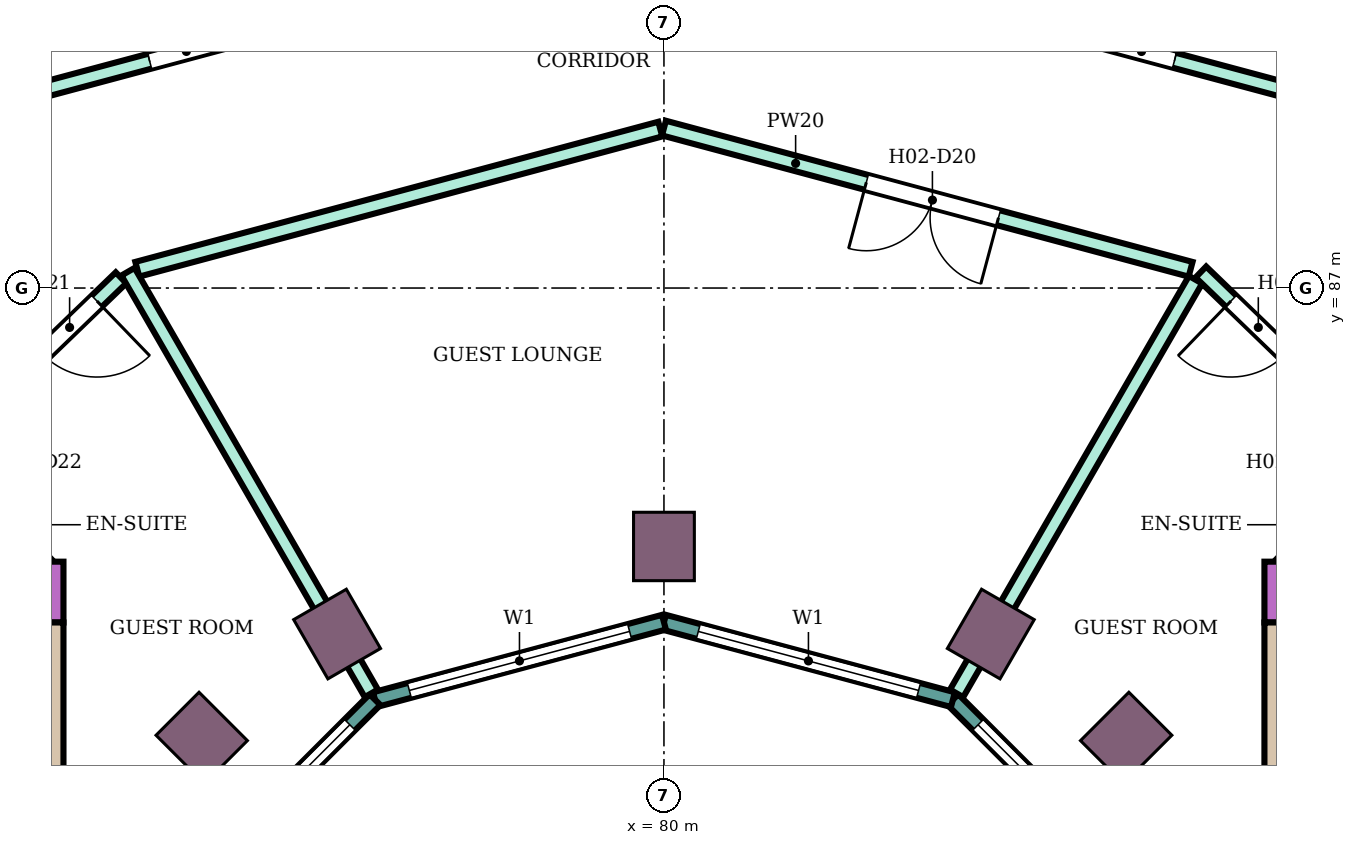
"""IFC4 building model, lengths in metres.
Left out: names, types, materials, properties, quantities, classifications, styles, units other than length and angle.
Written with IfcOpenShell. Run it as: python <this file> out.ifc"""

import sys

from ifc_helpers import new_model, si_unit, direction, frame, frame_2d, origin, origin_2d, place, context, subcontext, project, spatial, rectangle, extrude, element, fill, save


model = new_model("IFC4")
c1 = context("Model", 3, precision=1e-05, world=origin(), true_north=direction((0.0, 1.0)))
c2 = subcontext(c1, "Body", "Model", "MODEL_VIEW")
j1 = project(units=[si_unit("LENGTHUNIT", "METRE"), si_unit("PLANEANGLEUNIT", "RADIAN")], contexts=[c1])
p1 = place(None, origin())
s1 = spatial("IfcSite", under=j1, at=p1, CompositionType="ELEMENT")
p2 = place(p1, origin())
s2 = spatial("IfcBuilding", under=s1, at=p2, CompositionType="ELEMENT")
p3 = place(p2, frame((0.0, 0.0, 40.2)))
s3 = spatial("IfcBuildingStorey", under=s2, at=p3, CompositionType="ELEMENT", Elevation=40.2)
for number, where, z_axis, x_axis in (
    (1, (86.081, 81.081, 0.0), (0.0, 0.0, 1.0), (0.707, 0.707, 0.0)),
    (2, (84.3, 82.448, 0.0), (0.0, 0.0, 1.0), (0.5, 0.866, 0.0)),
    (3, (80.0, 83.6, 0.0), (0.0, 0.0, 1.0), (0.0, 1.0, 0.0)),
    (4, (75.7, 82.448, 0.0), (0.0, 0.0, 1.0), (-0.5, 0.866, 0.0)),
    (5, (73.919, 81.081, 0.0), (0.0, 0.0, 1.0), (-0.707, 0.707, 0.0)),
):
    element("IfcColumn", number, at=place(p3, frame(where, z_axis=z_axis, x_axis=x_axis)), inside=s3, PredefinedType="COLUMN", context=c2, shape_type="SweptSolid", body=[
        extrude(rectangle(XDim=0.9, YDim=0.8, at=origin_2d()), origin(), (0.0, 0.0, 1.0), 3.8),
    ])
p4 = place(p3, frame((87.9, 83.0, 0.0), z_axis=(0.0, 0.0, 1.0), x_axis=(1.0, 0.0, 0.0)))
e6 = element("IfcWall", 6, at=p4, inside=s3, PredefinedType="SHEAR", context=c2, shape_type="SweptSolid", body=[
    extrude(rectangle(XDim=14.7, YDim=0.8, at=frame_2d((7.35, 0.0))), origin(), (0.0, 0.0, 1.0), 3.48),
])
p5 = place(p4, frame((4.2, 0.0, 0.0)))
e7 = element("IfcOpeningElement", 7, at=p5, cuts=e6, PredefinedType="OPENING", context=c2, shape_type="SweptSolid", body=[
    extrude(rectangle(XDim=2.4, YDim=2.4, at=frame_2d((1.2, 1.2))), frame((0.0, 0.41, 0.0), z_axis=(0.0, -1.0, 0.0), x_axis=(1.0, 0.0, 0.0)), (0.0, 0.0, 1.0), 0.82),
])
p6 = place(p3, frame((88.125, 75.0, 0.0), z_axis=(0.0, 0.0, 1.0), x_axis=(0.0, 1.0, 0.0)))
e8 = element("IfcWall", 8, at=p6, inside=s3, PredefinedType="SHEAR", context=c2, shape_type="SweptSolid", body=[
    extrude(rectangle(XDim=7.6, YDim=0.45, at=frame_2d((3.8, 0.0))), origin(), (0.0, 0.0, 1.0), 3.48),
])
p7 = place(p3, frame((72.1, 83.0, 0.0), z_axis=(0.0, 0.0, 1.0), x_axis=(-1.0, 0.0, 0.0)))
e9 = element("IfcWall", 9, at=p7, inside=s3, PredefinedType="SHEAR", context=c2, shape_type="SweptSolid", body=[
    extrude(rectangle(XDim=14.7, YDim=0.8, at=frame_2d((7.35, 0.0))), origin(), (0.0, 0.0, 1.0), 3.48),
])
p8 = place(p7, frame((4.2, 0.0, 0.0)))
e10 = element("IfcOpeningElement", 10, at=p8, cuts=e9, PredefinedType="OPENING", context=c2, shape_type="SweptSolid", body=[
    extrude(rectangle(XDim=2.4, YDim=2.4, at=frame_2d((1.2, 1.2))), frame((0.0, 0.41, 0.0), z_axis=(0.0, -1.0, 0.0), x_axis=(1.0, 0.0, 0.0)), (0.0, 0.0, 1.0), 0.82),
])
p9 = place(p3, frame((71.875, 82.6, 0.0), z_axis=(0.0, 0.0, 1.0), x_axis=(0.0, -1.0, 0.0)))
e11 = element("IfcWall", 11, at=p9, inside=s3, PredefinedType="SHEAR", context=c2, shape_type="SweptSolid", body=[
    extrude(rectangle(XDim=7.6, YDim=0.45, at=frame_2d((3.8, 0.0))), origin(), (0.0, 0.0, 1.0), 3.48),
])
p10 = place(p3, frame((86.585, 78.802, 0.0), z_axis=(0.0, 0.0, 1.0), x_axis=(-0.707106781187, 0.707106781187, 0.0)))
e12 = element("IfcWall", 12, at=p10, inside=s3, PredefinedType="NOTDEFINED", context=c2, shape_type="SweptSolid", body=[
    extrude(rectangle(XDim=3.936, YDim=0.2, at=frame_2d((1.968, 0.0))), origin(), (0.0, 0.0, 1.0), 3.8),
])
p11 = place(p10, frame((0.468, 0.0, 0.9)))
e13 = element("IfcOpeningElement", 13, at=p11, cuts=e12, PredefinedType="OPENING", context=c2, shape_type="SweptSolid", body=[
    extrude(rectangle(XDim=3.0, YDim=2.3, at=frame_2d((1.5, 1.15))), frame((0.0, 0.11, 0.0), z_axis=(0.0, -1.0, 0.0), x_axis=(1.0, 0.0, 0.0)), (0.0, 0.0, 1.0), 0.22),
])
p12 = place(p3, frame((83.802, 81.585, 0.0), z_axis=(0.0, 0.0, 1.0), x_axis=(-0.965933654434, 0.258789828301, 0.0)))
e14 = element("IfcWall", 14, at=p12, inside=s3, PredefinedType="NOTDEFINED", context=c2, shape_type="SweptSolid", body=[
    extrude(rectangle(XDim=3.936, YDim=0.2, at=frame_2d((1.968, 0.0))), origin(), (0.0, 0.0, 1.0), 3.8),
])
p13 = place(p12, frame((0.468, 0.0, 0.9)))
e15 = element("IfcOpeningElement", 15, at=p13, cuts=e14, PredefinedType="OPENING", context=c2, shape_type="SweptSolid", body=[
    extrude(rectangle(XDim=3.0, YDim=2.3, at=frame_2d((1.5, 1.15))), frame((0.0, 0.11, 0.0), z_axis=(0.0, -1.0, 0.0), x_axis=(1.0, 0.0, 0.0)), (0.0, 0.0, 1.0), 0.22),
])
p14 = place(p3, frame((80.0, 82.604, 0.0), z_axis=(0.0, 0.0, 1.0), x_axis=(-0.965933654434, -0.258789828301, 0.0)))
e16 = element("IfcWall", 16, at=p14, inside=s3, PredefinedType="NOTDEFINED", context=c2, shape_type="SweptSolid", body=[
    extrude(rectangle(XDim=3.936, YDim=0.2, at=frame_2d((1.968, 0.0))), origin(), (0.0, 0.0, 1.0), 3.8),
])
p15 = place(p14, frame((0.468, 0.0, 0.9)))
e17 = element("IfcOpeningElement", 17, at=p15, cuts=e16, PredefinedType="OPENING", context=c2, shape_type="SweptSolid", body=[
    extrude(rectangle(XDim=3.0, YDim=2.3, at=frame_2d((1.5, 1.15))), frame((0.0, 0.11, 0.0), z_axis=(0.0, -1.0, 0.0), x_axis=(1.0, 0.0, 0.0)), (0.0, 0.0, 1.0), 0.22),
])
p16 = place(p3, frame((76.198, 81.585, 0.0), z_axis=(0.0, 0.0, 1.0), x_axis=(-0.707106781187, -0.707106781187, 0.0)))
e18 = element("IfcWall", 18, at=p16, inside=s3, PredefinedType="NOTDEFINED", context=c2, shape_type="SweptSolid", body=[
    extrude(rectangle(XDim=3.936, YDim=0.2, at=frame_2d((1.968, 0.0))), origin(), (0.0, 0.0, 1.0), 3.8),
])
p17 = place(p16, frame((0.468, 0.0, 0.9)))
e19 = element("IfcOpeningElement", 19, at=p17, cuts=e18, PredefinedType="OPENING", context=c2, shape_type="SweptSolid", body=[
    extrude(rectangle(XDim=3.0, YDim=2.3, at=frame_2d((1.5, 1.15))), frame((0.0, 0.11, 0.0), z_axis=(0.0, -1.0, 0.0), x_axis=(1.0, 0.0, 0.0)), (0.0, 0.0, 1.0), 0.22),
])
p18 = place(p3, frame((68.987, 83.4, 0.0), z_axis=(0.0, 0.0, 1.0), x_axis=(0.719591503389, 0.694397629784, 0.0)))
e20 = element("IfcWall", 20, at=p18, inside=s3, PredefinedType="PARTITIONING", context=c2, shape_type="SweptSolid", body=[
    extrude(rectangle(XDim=5.378, YDim=0.2, at=frame_2d((2.689, 0.0))), origin(), (0.0, 0.0, 1.0), 3.35),
])
p19 = place(p18, frame((3.938, 0.0, 0.0)))
e21 = element("IfcOpeningElement", 21, at=p19, cuts=e20, PredefinedType="OPENING", context=c2, shape_type="SweptSolid", body=[
    extrude(rectangle(XDim=1.0, YDim=2.1, at=frame_2d((0.5, 1.05))), frame((0.0, 0.11, 0.0), z_axis=(0.0, -1.0, 0.0), x_axis=(1.0, 0.0, 0.0)), (0.0, 0.0, 1.0), 0.22),
])
p20 = place(p3, frame((71.614, 89.55, 0.0), z_axis=(0.0, 0.0, 1.0), x_axis=(0.96597505802, 0.258635239832, 0.0)))
e22 = element("IfcWall", 22, at=p20, inside=s3, PredefinedType="PARTITIONING", context=c2, shape_type="SweptSolid", body=[
    extrude(rectangle(XDim=8.592, YDim=0.2, at=frame_2d((4.296, 0.0))), origin(), (0.0, 0.0, 1.0), 3.35),
])
p21 = place(p20, frame((4.865, 0.0, 0.0)))
e23 = element("IfcOpeningElement", 23, at=p21, cuts=e22, PredefinedType="OPENING", context=c2, shape_type="SweptSolid", body=[
    extrude(rectangle(XDim=1.0, YDim=2.1, at=frame_2d((0.5, 1.05))), frame((0.0, 0.11, 0.0), z_axis=(0.0, -1.0, 0.0), x_axis=(1.0, 0.0, 0.0)), (0.0, 0.0, 1.0), 0.22),
])
p22 = place(p20, frame((1.677, 0.0, 0.0)))
e24 = element("IfcOpeningElement", 24, at=p22, cuts=e22, PredefinedType="OPENING", context=c2, shape_type="SweptSolid", body=[
    extrude(rectangle(XDim=1.0, YDim=2.1, at=frame_2d((0.5, 1.05))), frame((0.0, 0.11, 0.0), z_axis=(0.0, -1.0, 0.0), x_axis=(1.0, 0.0, 0.0)), (0.0, 0.0, 1.0), 0.22),
])
p23 = place(p3, frame((73.071, 87.247, 0.0), z_axis=(0.0, 0.0, 1.0), x_axis=(0.965920206274, 0.258840018373, 0.0)))
e25 = element("IfcWall", 25, at=p23, inside=s3, PredefinedType="PARTITIONING", context=c2, shape_type="SweptSolid", body=[
    extrude(rectangle(XDim=7.123, YDim=0.2, at=frame_2d((3.562, 0.0))), origin(), (0.0, 0.0, 1.0), 3.35),
])
p24 = place(p3, frame((72.949, 87.215, 0.0), z_axis=(0.0, 0.0, 1.0), x_axis=(0.499890755261, -0.866088467077, 0.0)))
e26 = element("IfcWall", 26, at=p24, inside=s3, PredefinedType="PARTITIONING", context=c2, shape_type="SweptSolid", body=[
    extrude(rectangle(XDim=6.404, YDim=0.2, at=frame_2d((3.202, 0.0))), origin(), (0.0, 0.0, 1.0), 3.35),
])
p25 = place(p3, frame((80.0, 89.104, 0.0), z_axis=(0.0, 0.0, 1.0), x_axis=(0.965886659739, -0.258965172444, 0.0)))
e27 = element("IfcWall", 27, at=p25, inside=s3, PredefinedType="PARTITIONING", context=c2, shape_type="SweptSolid", body=[
    extrude(rectangle(XDim=7.173, YDim=0.2, at=frame_2d((3.587, 0.0))), origin(), (0.0, 0.0, 1.0), 3.35),
])
p26 = place(p25, frame((2.757, 0.0, 0.0)))
e28 = element("IfcOpeningElement", 28, at=p26, cuts=e27, PredefinedType="OPENING", context=c2, shape_type="SweptSolid", body=[
    extrude(rectangle(XDim=1.8, YDim=2.1, at=frame_2d((0.9, 1.05))), frame((0.0, 0.11, 0.0), z_axis=(0.0, -1.0, 0.0), x_axis=(1.0, 0.0, 0.0)), (0.0, 0.0, 1.0), 0.22),
])
p27 = place(p3, frame((80.0, 91.796, 0.0), z_axis=(0.0, 0.0, 1.0), x_axis=(0.965896351823, -0.258929020266, 0.0)))
e29 = element("IfcWall", 29, at=p27, inside=s3, PredefinedType="PARTITIONING", context=c2, shape_type="SweptSolid", body=[
    extrude(rectangle(XDim=8.602, YDim=0.2, at=frame_2d((4.301, 0.0))), origin(), (0.0, 0.0, 1.0), 3.35),
])
p28 = place(p27, frame((6.055, 0.0, 0.0)))
e30 = element("IfcOpeningElement", 30, at=p28, cuts=e29, PredefinedType="OPENING", context=c2, shape_type="SweptSolid", body=[
    extrude(rectangle(XDim=0.9, YDim=2.1, at=frame_2d((0.45, 1.05))), frame((0.0, 0.11, 0.0), z_axis=(0.0, -1.0, 0.0), x_axis=(1.0, 0.0, 0.0)), (0.0, 0.0, 1.0), 0.22),
])
p29 = place(p27, frame((2.817, 0.0, 0.0)))
e31 = element("IfcOpeningElement", 31, at=p29, cuts=e29, PredefinedType="OPENING", context=c2, shape_type="SweptSolid", body=[
    extrude(rectangle(XDim=1.0, YDim=2.1, at=frame_2d((0.5, 1.05))), frame((0.0, 0.11, 0.0), z_axis=(0.0, -1.0, 0.0), x_axis=(1.0, 0.0, 0.0)), (0.0, 0.0, 1.0), 0.22),
])
p30 = place(p3, frame((83.85, 81.668, 0.0), z_axis=(0.0, 0.0, 1.0), x_axis=(0.500233583443, 0.865890502313, 0.0)))
e32 = element("IfcWall", 32, at=p30, inside=s3, PredefinedType="PARTITIONING", context=c2, shape_type="SweptSolid", body=[
    extrude(rectangle(XDim=6.284, YDim=0.2, at=frame_2d((3.142, 0.0))), origin(), (0.0, 0.0, 1.0), 3.35),
])
p31 = place(p3, frame((87.064, 87.211, 0.0), z_axis=(0.0, 0.0, 1.0), x_axis=(0.719540958932, -0.694450004262, 0.0)))
e33 = element("IfcWall", 33, at=p31, inside=s3, PredefinedType="PARTITIONING", context=c2, shape_type="SweptSolid", body=[
    extrude(rectangle(XDim=5.488, YDim=0.2, at=frame_2d((2.744, 0.0))), origin(), (0.0, 0.0, 1.0), 3.35),
])
p32 = place(p31, frame((0.55, 0.0, 0.0)))
e34 = element("IfcOpeningElement", 34, at=p32, cuts=e33, PredefinedType="OPENING", context=c2, shape_type="SweptSolid", body=[
    extrude(rectangle(XDim=1.0, YDim=2.1, at=frame_2d((0.5, 1.05))), frame((0.0, 0.11, 0.0), z_axis=(0.0, -1.0, 0.0), x_axis=(1.0, 0.0, 0.0)), (0.0, 0.0, 1.0), 0.22),
])
p33 = place(p11, origin())
e35 = element("IfcWindow", 35, at=p33, inside=s3, PartitioningType="SINGLE_PANEL", PredefinedType="WINDOW", context=c2, shape_type="SweptSolid", body=[
    extrude(rectangle(XDim=3.0, YDim=2.3, at=frame_2d((1.5, 1.15))), frame((0.0, 0.03, 0.0), z_axis=(0.0, -1.0, 0.0), x_axis=(1.0, 0.0, 0.0)), (0.0, 0.0, 1.0), 0.06),
])
fill(e13, e35)
p34 = place(p13, origin())
e36 = element("IfcWindow", 36, at=p34, inside=s3, PartitioningType="SINGLE_PANEL", PredefinedType="WINDOW", context=c2, shape_type="SweptSolid", body=[
    extrude(rectangle(XDim=3.0, YDim=2.3, at=frame_2d((1.5, 1.15))), frame((0.0, 0.03, 0.0), z_axis=(0.0, -1.0, 0.0), x_axis=(1.0, 0.0, 0.0)), (0.0, 0.0, 1.0), 0.06),
])
fill(e15, e36)
p35 = place(p15, origin())
e37 = element("IfcWindow", 37, at=p35, inside=s3, PartitioningType="SINGLE_PANEL", PredefinedType="WINDOW", context=c2, shape_type="SweptSolid", body=[
    extrude(rectangle(XDim=3.0, YDim=2.3, at=frame_2d((1.5, 1.15))), frame((0.0, 0.03, 0.0), z_axis=(0.0, -1.0, 0.0), x_axis=(1.0, 0.0, 0.0)), (0.0, 0.0, 1.0), 0.06),
])
fill(e17, e37)
p36 = place(p17, origin())
e38 = element("IfcWindow", 38, at=p36, inside=s3, PartitioningType="SINGLE_PANEL", PredefinedType="WINDOW", context=c2, shape_type="SweptSolid", body=[
    extrude(rectangle(XDim=3.0, YDim=2.3, at=frame_2d((1.5, 1.15))), frame((0.0, 0.03, 0.0), z_axis=(0.0, -1.0, 0.0), x_axis=(1.0, 0.0, 0.0)), (0.0, 0.0, 1.0), 0.06),
])
fill(e19, e38)
p37 = place(p28, origin())
e39 = element("IfcDoor", 39, at=p37, inside=s3, OperationType="SINGLE_SWING_LEFT", PredefinedType="DOOR", context=c2, shape_type="SweptSolid", body=[
    extrude(rectangle(XDim=0.9, YDim=2.1, at=frame_2d((0.45, 1.05))), frame((0.0, 0.025, 0.0), z_axis=(0.0, -1.0, 0.0), x_axis=(1.0, 0.0, 0.0)), (0.0, 0.0, 1.0), 0.05),
])
fill(e30, e39)
p38 = place(p22, origin())
e40 = element("IfcDoor", 40, at=p38, inside=s3, OperationType="SINGLE_SWING_RIGHT", PredefinedType="DOOR", context=c2, shape_type="SweptSolid", body=[
    extrude(rectangle(XDim=1.0, YDim=2.1, at=frame_2d((0.5, 1.05))), frame((0.0, 0.025, 0.0), z_axis=(0.0, -1.0, 0.0), x_axis=(1.0, 0.0, 0.0)), (0.0, 0.0, 1.0), 0.05),
])
fill(e24, e40)
p39 = place(p32, frame((1.0, 0.0, 0.0), z_axis=(0.0, 0.0, 1.0), x_axis=(-1.0, 0.0, 0.0)))
e41 = element("IfcDoor", 41, at=p39, inside=s3, OperationType="SINGLE_SWING_RIGHT", PredefinedType="DOOR", context=c2, shape_type="SweptSolid", body=[
    extrude(rectangle(XDim=1.0, YDim=2.1, at=frame_2d((0.5, 1.05))), frame((0.0, 0.025, 0.0), z_axis=(0.0, -1.0, 0.0), x_axis=(1.0, 0.0, 0.0)), (0.0, 0.0, 1.0), 0.05),
])
fill(e34, e41)
p40 = place(p26, frame((1.8, 0.0, 0.0), z_axis=(0.0, 0.0, 1.0), x_axis=(-1.0, 0.0, 0.0)))
e42 = element("IfcDoor", 42, at=p40, inside=s3, OperationType="DOUBLE_DOOR_SINGLE_SWING", PredefinedType="DOOR", context=c2, shape_type="SweptSolid", body=[
    extrude(rectangle(XDim=1.8, YDim=2.1, at=frame_2d((0.9, 1.05))), frame((0.0, 0.025, 0.0), z_axis=(0.0, -1.0, 0.0), x_axis=(1.0, 0.0, 0.0)), (0.0, 0.0, 1.0), 0.05),
])
fill(e28, e42)
p41 = place(p19, frame((1.0, 0.0, 0.0), z_axis=(0.0, 0.0, 1.0), x_axis=(-1.0, 0.0, 0.0)))
e43 = element("IfcDoor", 43, at=p41, inside=s3, OperationType="SINGLE_SWING_LEFT", PredefinedType="DOOR", context=c2, shape_type="SweptSolid", body=[
    extrude(rectangle(XDim=1.0, YDim=2.1, at=frame_2d((0.5, 1.05))), frame((0.0, 0.025, 0.0), z_axis=(0.0, -1.0, 0.0), x_axis=(1.0, 0.0, 0.0)), (0.0, 0.0, 1.0), 0.05),
])
fill(e21, e43)
save(model, sys.argv[1])
